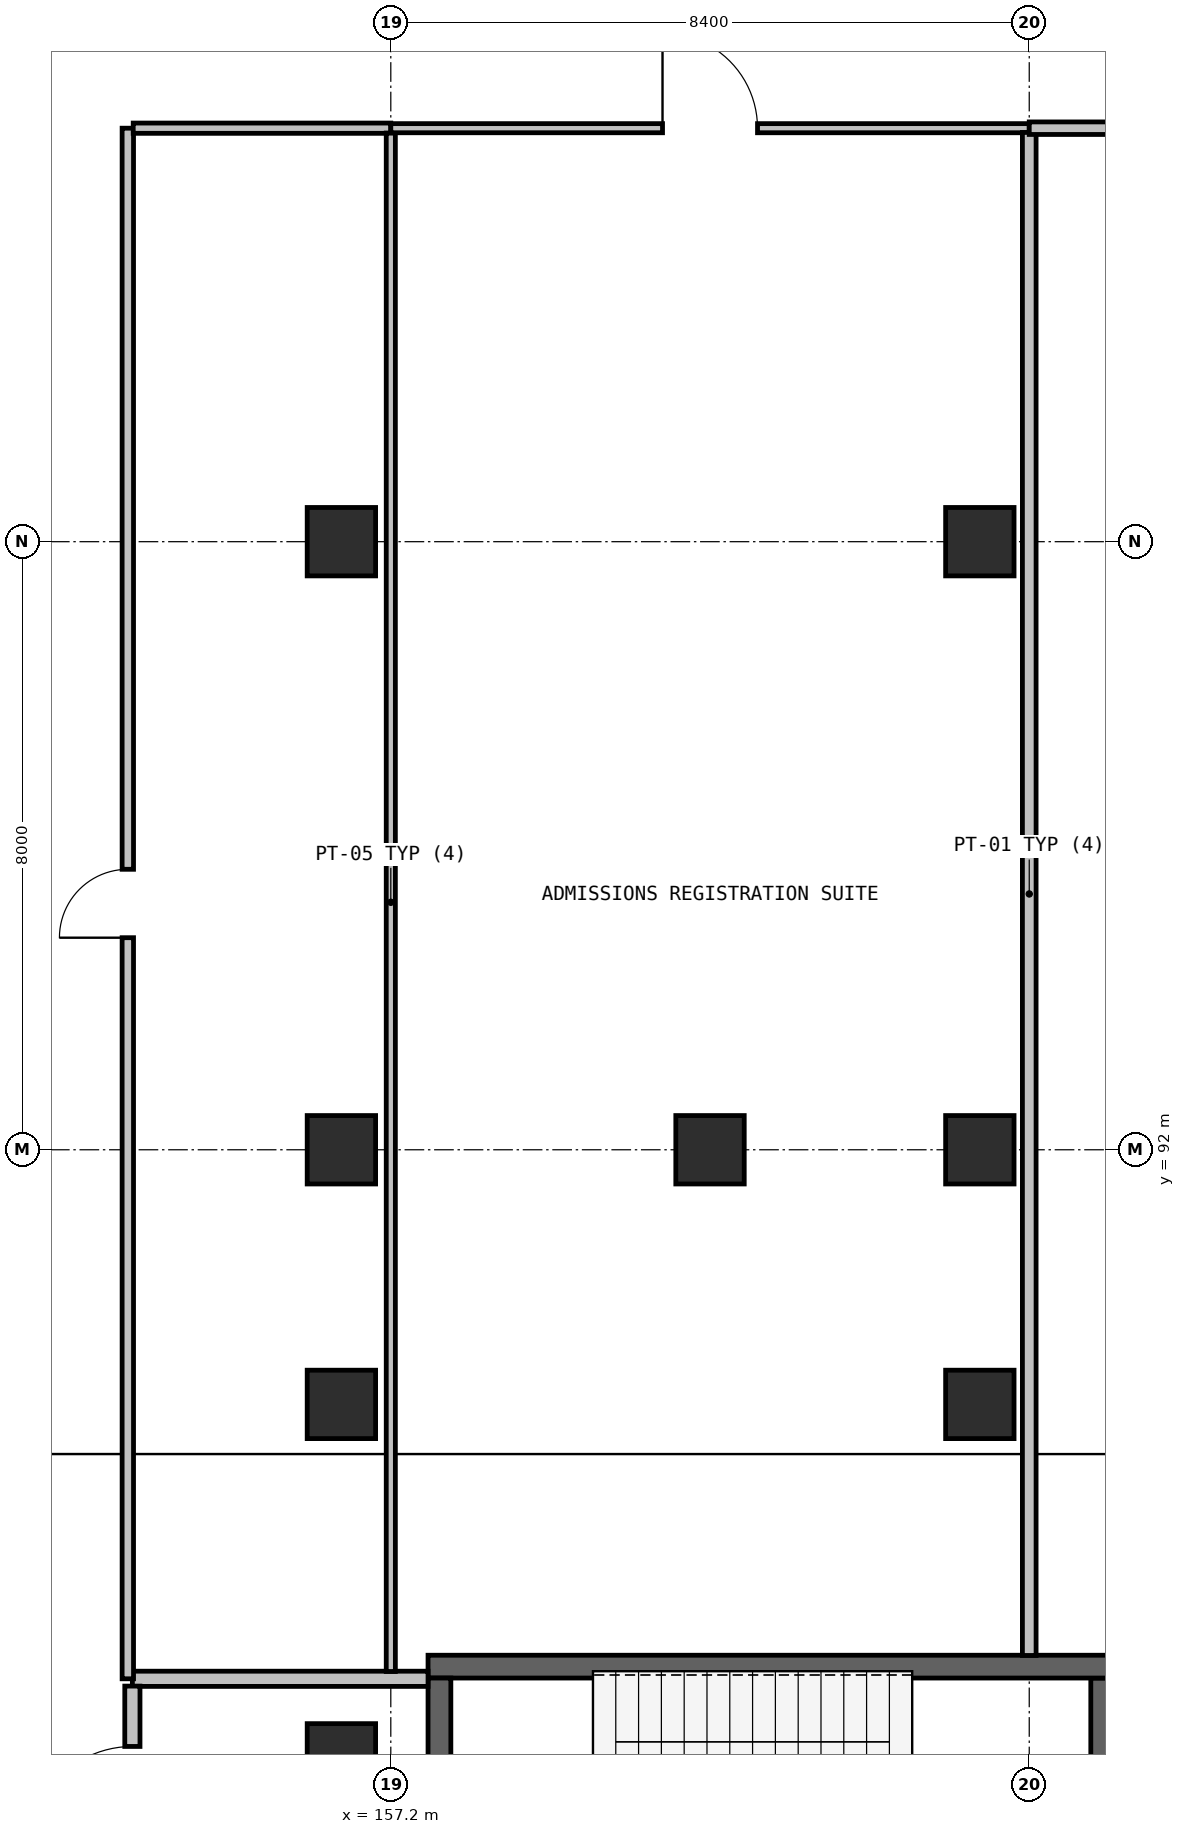
"""IFC4 building model, lengths in metres.
Left out: names, types, materials, properties, quantities, classifications, styles, units other than length and angle.
Written with IfcOpenShell. Run it as: python <this file> out.ifc"""

import sys

from ifc_helpers import new_model, si_unit, direction, frame, frame_2d, origin, origin_2d, place, context, subcontext, project, spatial, rectangle, extrude, element, fill, save


model = new_model("IFC4")
c1 = context("Model", 3, precision=1e-05, world=origin(), true_north=direction((0.0, 1.0)))
c2 = subcontext(c1, "Body", "Model", "MODEL_VIEW")
j1 = project(units=[si_unit("LENGTHUNIT", "METRE"), si_unit("PLANEANGLEUNIT", "RADIAN")], contexts=[c1])
p1 = place(None, origin())
s1 = spatial("IfcSite", under=j1, at=p1, CompositionType="ELEMENT")
p2 = place(p1, origin())
s2 = spatial("IfcBuilding", under=s1, at=p2, CompositionType="ELEMENT")
p3 = place(p2, origin())
s3 = spatial("IfcBuildingStorey", under=s2, at=p3, CompositionType="ELEMENT", Elevation=0.0)
for number, where, z_axis, x_axis in (
    (1, (161.4, 92.0, 0.0), (0.0, 0.0, 1.0), (1.0, 0.0, 0.0)),
    (2, (156.55, 84.0, 0.0), (0.0, 0.0, 1.0), (1.0, 0.0, 0.0)),
    (3, (156.55, 88.65, 0.0), (0.0, 0.0, 1.0), (1.0, 0.0, 0.0)),
    (4, (156.55, 92.0, 0.0), (0.0, 0.0, 1.0), (1.0, 0.0, 0.0)),
    (5, (156.55, 100.0, 0.0), (0.0, 0.0, 1.0), (1.0, 0.0, 0.0)),
    (6, (164.95, 88.65, 0.0), (0.0, 0.0, 1.0), (1.0, 0.0, 0.0)),
    (7, (164.95, 92.0, 0.0), (0.0, 0.0, 1.0), (1.0, 0.0, 0.0)),
    (8, (164.95, 100.0, 0.0), (0.0, 0.0, 1.0), (1.0, 0.0, 0.0)),
):
    element("IfcColumn", number, at=place(p3, frame(where, z_axis=z_axis, x_axis=x_axis)), inside=s3, PredefinedType="COLUMN", context=c2, shape_type="SweptSolid", body=[
        extrude(rectangle(XDim=0.9, YDim=0.9, at=origin_2d()), origin(), (0.0, 0.0, 1.0), 5.4),
    ])
p4 = place(p3, frame((166.56, 81.19, 0.0), z_axis=(0.0, 0.0, 1.0), x_axis=(0.0, 1.0, 0.0)))
e9 = element("IfcWall", 9, at=p4, inside=s3, PredefinedType="SHEAR", context=c2, shape_type="SweptSolid", body=[
    extrude(rectangle(XDim=3.86, YDim=0.3, at=frame_2d((1.93, 0.0))), origin(), (0.0, 0.0, 1.0), 5.08),
])
p5 = place(p3, frame((166.71, 85.2, 0.0), z_axis=(0.0, 0.0, 1.0), x_axis=(-1.0, 0.0, 0.0)))
e10 = element("IfcWall", 10, at=p5, inside=s3, PredefinedType="SHEAR", context=c2, shape_type="SweptSolid", body=[
    extrude(rectangle(XDim=9.02, YDim=0.3, at=frame_2d((4.51, 0.0))), origin(), (0.0, 0.0, 1.0), 5.08),
])
p6 = place(p3, frame((157.84, 85.05, 0.0), z_axis=(0.0, 0.0, 1.0), x_axis=(0.0, -1.0, 0.0)))
e11 = element("IfcWall", 11, at=p6, inside=s3, PredefinedType="SHEAR", context=c2, shape_type="SweptSolid", body=[
    extrude(rectangle(XDim=3.86, YDim=0.3, at=frame_2d((1.93, 0.0))), origin(), (0.0, 0.0, 1.0), 5.08),
])
p7 = place(p6, frame((1.38, 0.0, 0.0)))
e12 = element("IfcOpeningElement", 12, at=p7, cuts=e11, PredefinedType="OPENING", context=c2, shape_type="SweptSolid", body=[
    extrude(rectangle(XDim=1.1, YDim=2.15, at=frame_2d((0.55, 1.075))), frame((0.0, 0.16, 0.0), z_axis=(0.0, -1.0, 0.0), x_axis=(1.0, 0.0, 0.0)), (0.0, 0.0, 1.0), 0.32),
])
p8 = place(p3, frame((153.8, 85.04, 0.0), z_axis=(0.0, 0.0, 1.0), x_axis=(1.0, 0.0, 0.0)))
e13 = element("IfcWall", 13, at=p8, inside=s3, PredefinedType="SOLIDWALL", context=c2, shape_type="SweptSolid", body=[
    extrude(rectangle(XDim=3.89, YDim=0.2, at=frame_2d((1.945, 0.0))), origin(), (0.0, 0.0, 1.0), 5.08),
])
p9 = place(p3, frame((153.8, 79.696, 0.0), z_axis=(0.0, 0.0, 1.0), x_axis=(0.0, 1.0, 0.0)))
e14 = element("IfcWall", 14, at=p9, inside=s3, PredefinedType="SOLIDWALL", context=c2, shape_type="SweptSolid", body=[
    extrude(rectangle(XDim=5.248, YDim=0.2, at=frame_2d((2.624, 0.0))), origin(), (0.0, 0.0, 1.0), 5.08),
])
p10 = place(p9, frame((3.104, 0.0, 0.0)))
e15 = element("IfcOpeningElement", 15, at=p10, cuts=e14, PredefinedType="OPENING", context=c2, shape_type="SweptSolid", body=[
    extrude(rectangle(XDim=1.35, YDim=2.15, at=frame_2d((0.675, 1.075))), frame((0.0, 0.11, 0.0), z_axis=(0.0, -1.0, 0.0), x_axis=(1.0, 0.0, 0.0)), (0.0, 0.0, 1.0), 0.22),
])
p11 = place(p3, frame((153.74, 85.04, 0.0), z_axis=(0.0, 0.0, 1.0), x_axis=(0.0, 1.0, 0.0)))
e16 = element("IfcWall", 16, at=p11, inside=s3, PredefinedType="PARTITIONING", context=c2, shape_type="SweptSolid", body=[
    extrude(rectangle(XDim=20.4, YDim=0.15, at=frame_2d((10.2, 0.0))), origin(), (0.0, 0.0, 1.0), 5.08),
])
p12 = place(p11, frame((9.75, 0.0, 0.0)))
e17 = element("IfcOpeningElement", 17, at=p12, cuts=e16, PredefinedType="OPENING", context=c2, shape_type="SweptSolid", body=[
    extrude(rectangle(XDim=0.9, YDim=2.1, at=frame_2d((0.45, 1.05))), frame((0.0, 0.085, 0.0), z_axis=(0.0, -1.0, 0.0), x_axis=(1.0, 0.0, 0.0)), (0.0, 0.0, 1.0), 0.17),
])
p13 = place(p3, frame((153.811, 105.44, 0.0), z_axis=(0.0, 0.0, 1.0), x_axis=(1.0, 0.0, 0.0)))
e18 = element("IfcWall", 18, at=p13, inside=s3, PredefinedType="PARTITIONING", context=c2, shape_type="SweptSolid", body=[
    extrude(rectangle(XDim=3.389, YDim=0.135, at=frame_2d((1.694, 0.0))), origin(), (0.0, 0.0, 1.0), 5.08),
])
p14 = place(p3, frame((157.2, 105.376, 0.0), z_axis=(0.0, 0.0, 1.0), x_axis=(0.0, -1.0, 0.0)))
e19 = element("IfcWall", 19, at=p14, inside=s3, PredefinedType="PARTITIONING", context=c2, shape_type="SweptSolid", body=[
    extrude(rectangle(XDim=20.24, YDim=0.12, at=frame_2d((10.12, 0.0))), origin(), (0.0, 0.0, 1.0), 5.08),
])
p15 = place(p3, frame((157.2, 105.44, 0.0), z_axis=(0.0, 0.0, 1.0), x_axis=(1.0, 0.0, 0.0)))
e20 = element("IfcWall", 20, at=p15, inside=s3, PredefinedType="PARTITIONING", context=c2, shape_type="SweptSolid", body=[
    extrude(rectangle(XDim=8.4, YDim=0.12, at=frame_2d((4.2, 0.0))), origin(), (0.0, 0.0, 1.0), 5.08),
])
p16 = place(p15, frame((3.575, 0.0, 0.0)))
e21 = element("IfcOpeningElement", 21, at=p16, cuts=e20, PredefinedType="OPENING", context=c2, shape_type="SweptSolid", body=[
    extrude(rectangle(XDim=1.25, YDim=2.15, at=frame_2d((0.625, 1.075))), frame((0.0, 0.07, 0.0), z_axis=(0.0, -1.0, 0.0), x_axis=(1.0, 0.0, 0.0)), (0.0, 0.0, 1.0), 0.14),
])
p17 = place(p3, frame((165.6, 105.384, 0.0), z_axis=(0.0, 0.0, 1.0), x_axis=(0.0, -1.0, 0.0)))
e22 = element("IfcWall", 22, at=p17, inside=s3, PredefinedType="PARTITIONING", context=c2, shape_type="SweptSolid", body=[
    extrude(rectangle(XDim=20.037, YDim=0.18, at=frame_2d((10.019, 0.0))), origin(), (0.0, 0.0, 1.0), 5.08),
])
p18 = place(p3, frame((165.6, 105.44, 0.0), z_axis=(0.0, 0.0, 1.0), x_axis=(1.0, 0.0, 0.0)))
e23 = element("IfcWall", 23, at=p18, inside=s3, PredefinedType="PARTITIONING", context=c2, shape_type="SweptSolid", body=[
    extrude(rectangle(XDim=8.4, YDim=0.165, at=frame_2d((4.2, 0.0))), origin(), (0.0, 0.0, 1.0), 5.08),
])
p19 = place(p18, frame((3.6, 0.0, 0.0)))
e24 = element("IfcOpeningElement", 24, at=p19, cuts=e23, PredefinedType="OPENING", context=c2, shape_type="SweptSolid", body=[
    extrude(rectangle(XDim=1.2, YDim=2.15, at=frame_2d((0.6, 1.075))), frame((0.0, 0.093, 0.0), z_axis=(0.0, -1.0, 0.0), x_axis=(1.0, 0.0, 0.0)), (0.0, 0.0, 1.0), 0.185),
])
p20 = place(p10, origin())
e25 = element("IfcDoor", 25, at=p20, inside=s3, OperationType="SINGLE_SWING_LEFT", PredefinedType="DOOR", context=c2, shape_type="SweptSolid", body=[
    extrude(rectangle(XDim=1.35, YDim=2.15, at=frame_2d((0.675, 1.075))), frame((0.0, 0.025, 0.0), z_axis=(0.0, -1.0, 0.0), x_axis=(1.0, 0.0, 0.0)), (0.0, 0.0, 1.0), 0.05),
])
fill(e15, e25)
p21 = place(p12, origin())
e26 = element("IfcDoor", 26, at=p21, inside=s3, OperationType="SINGLE_SWING_RIGHT", PredefinedType="DOOR", context=c2, shape_type="SweptSolid", body=[
    extrude(rectangle(XDim=0.9, YDim=2.1, at=frame_2d((0.45, 1.05))), frame((0.0, 0.025, 0.0), z_axis=(0.0, -1.0, 0.0), x_axis=(1.0, 0.0, 0.0)), (0.0, 0.0, 1.0), 0.05),
])
fill(e17, e26)
p22 = place(p16, origin())
e27 = element("IfcDoor", 27, at=p22, inside=s3, OperationType="SINGLE_SWING_RIGHT", PredefinedType="DOOR", context=c2, shape_type="SweptSolid", body=[
    extrude(rectangle(XDim=1.25, YDim=2.15, at=frame_2d((0.625, 1.075))), frame((0.0, 0.025, 0.0), z_axis=(0.0, -1.0, 0.0), x_axis=(1.0, 0.0, 0.0)), (0.0, 0.0, 1.0), 0.05),
])
fill(e21, e27)
save(model, sys.argv[1])
